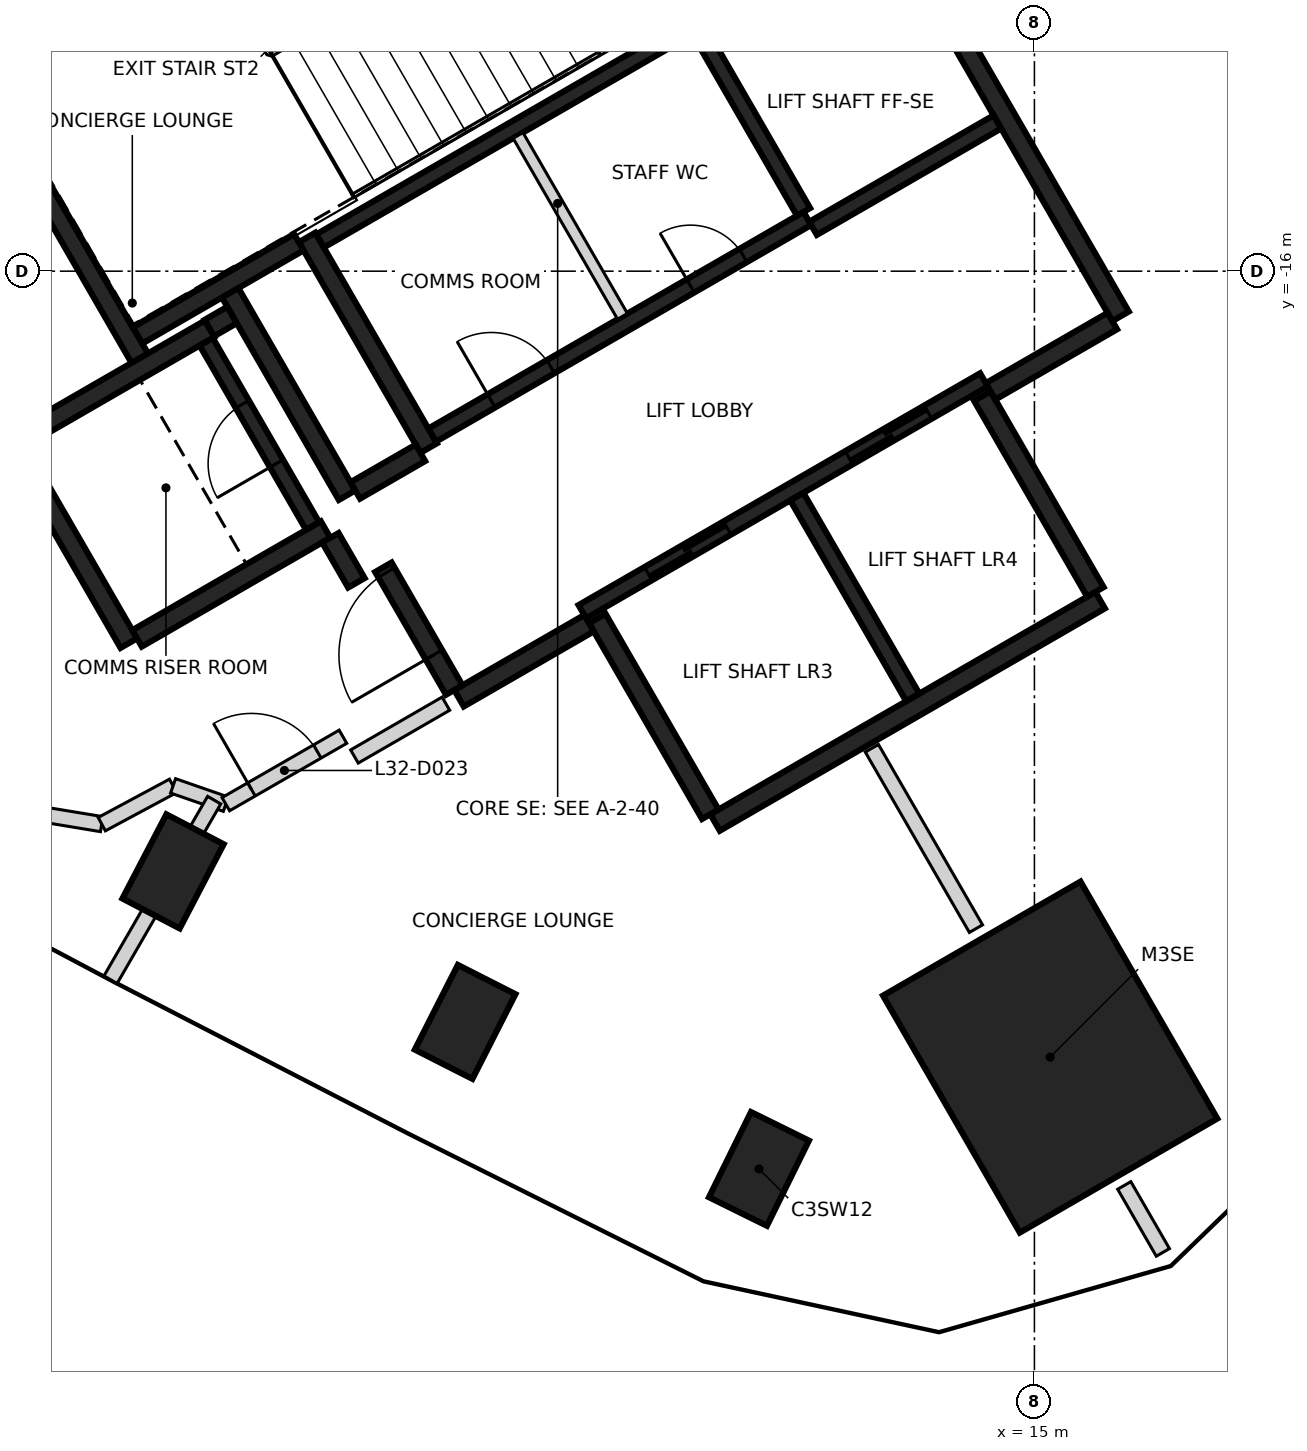
"""IFC4 building model, lengths in metres.
Left out: names, types, materials, properties, quantities, classifications, styles, units other than length and angle.
Written with IfcOpenShell. Run it as: python <this file> out.ifc"""

import sys

from ifc_helpers import new_model, si_unit, direction, frame, frame_2d, origin, origin_2d, place, context, subcontext, project, spatial, rectangle, extrude, element, fill, save


model = new_model("IFC4")
c1 = context("Model", 3, precision=1e-05, world=origin(), true_north=direction((0.0, 1.0)))
c2 = subcontext(c1, "Body", "Model", "MODEL_VIEW")
j1 = project(units=[si_unit("LENGTHUNIT", "METRE"), si_unit("PLANEANGLEUNIT", "RADIAN")], contexts=[c1])
p1 = place(None, origin())
s1 = spatial("IfcSite", under=j1, at=p1, CompositionType="ELEMENT")
p2 = place(p1, origin())
s2 = spatial("IfcBuilding", under=s1, at=p2, CompositionType="ELEMENT")
p3 = place(p2, frame((0.0, 0.0, 132.4)))
s3 = spatial("IfcBuildingStorey", under=s2, at=p3, CompositionType="ELEMENT", Elevation=132.4)
for number, where, z_axis, x_axis in (
    (1, (3.667, -23.896, -0.4), (0.0, 0.0, 1.0), (0.463, 0.886, 0.0)),
    (2, (7.51, -25.876, -0.4), (0.0, 0.0, 1.0), (0.453, 0.892, 0.0)),
    (3, (11.376, -27.811, -0.4), (0.0, 0.0, 1.0), (0.442, 0.897, 0.0)),
):
    element("IfcColumn", number, at=place(p3, frame(where, z_axis=z_axis, x_axis=x_axis)), inside=s3, PredefinedType="COLUMN", context=c2, shape_type="SweptSolid", body=[
        extrude(rectangle(XDim=1.25, YDim=0.85, at=origin_2d()), origin(), (0.0, 0.0, 1.0), 3.6),
    ])
p4 = place(p3, frame((15.207, -26.34, -0.4), z_axis=(0.0, 0.0, 1.0), x_axis=(-0.5, 0.866025403784, 0.0)))
e4 = element("IfcColumn", 4, at=p4, inside=s3, PredefinedType="COLUMN", context=c2, shape_type="SweptSolid", body=[
    extrude(rectangle(XDim=3.6, YDim=3.0, at=origin_2d()), origin(), (0.0, 0.0, 1.0), 3.6),
])
p5 = place(p3, frame((13.008, -11.181, 0.0), z_axis=(0.0, 0.0, 1.0), x_axis=(0.500004234368, -0.866022959057, 0.0)))
e5 = element("IfcWall", 5, at=p5, inside=s3, PredefinedType="SHEAR", context=c2, shape_type="SweptSolid", body=[
    extrude(rectangle(XDim=6.25, YDim=0.25, at=frame_2d((3.125, 0.0))), origin(), (0.0, 0.0, 1.0), 3.2),
])
p6 = place(p3, frame((15.865, -20.328, 0.0), z_axis=(0.0, 0.0, 1.0), x_axis=(-0.86602852612, -0.499994591916, 0.0)))
e6 = element("IfcWall", 6, at=p6, inside=s3, PredefinedType="SHEAR", context=c2, shape_type="SweptSolid", body=[
    extrude(rectangle(XDim=5.85, YDim=0.25, at=frame_2d((2.925, 0.0))), origin(), (0.0, 0.0, 1.0), 3.2),
])
p7 = place(p3, frame((3.235, -17.153, 0.0), z_axis=(0.0, 0.0, 1.0), x_axis=(-0.500008851346, 0.866020293397, 0.0)))
e7 = element("IfcWall", 7, at=p7, inside=s3, PredefinedType="SHEAR", context=c2, shape_type="SweptSolid", body=[
    extrude(rectangle(XDim=5.51, YDim=0.25, at=frame_2d((2.755, 0.0))), origin(), (0.0, 0.0, 1.0), 3.2),
])
p8 = place(p3, frame((7.031, -18.327, 0.0), z_axis=(0.0, 0.0, 1.0), x_axis=(-0.499971222258, 0.866042017984, 0.0)))
e8 = element("IfcWall", 8, at=p8, inside=s3, PredefinedType="SHEAR", context=c2, shape_type="SweptSolid", body=[
    extrude(rectangle(XDim=3.2, YDim=0.25, at=frame_2d((1.6, 0.0))), origin(), (0.0, 0.0, 1.0), 3.2),
])
for number, where, z_axis, x_axis in (
    (9, (14.315, -17.644, 0.0), (0.0, 0.0, 1.0), (0.5, -0.866, 0.0)),
    (10, (10.736, -23.145, 0.0), (0.0, 0.0, 1.0), (-0.5, 0.866, 0.0)),
):
    element("IfcWall", number, at=place(p3, frame(where, z_axis=z_axis, x_axis=x_axis)), inside=s3, PredefinedType="SHEAR", context=c2, shape_type="SweptSolid", body=[
        extrude(rectangle(XDim=2.974, YDim=0.25, at=frame_2d((1.487, 0.0))), origin(), (0.0, 0.0, 1.0), 3.2),
    ])
p9 = place(p3, frame((3.085, -20.894, 0.0), z_axis=(0.0, 0.0, 1.0), x_axis=(-0.499978833458, 0.866037623948, 0.0)))
e11 = element("IfcWall", 11, at=p9, inside=s3, PredefinedType="SHEAR", context=c2, shape_type="SweptSolid", body=[
    extrude(rectangle(XDim=3.05, YDim=0.25, at=frame_2d((1.525, 0.0))), origin(), (0.0, 0.0, 1.0), 3.2),
])
p10 = place(p3, frame((1.669, -18.19, 0.0), z_axis=(0.0, 0.0, 1.0), x_axis=(0.866042235819, 0.499970844928, 0.0)))
e12 = element("IfcWall", 12, at=p10, inside=s3, PredefinedType="SHEAR", context=c2, shape_type="SweptSolid", body=[
    extrude(rectangle(XDim=2.865, YDim=0.25, at=frame_2d((1.432, 0.0))), origin(), (0.0, 0.0, 1.0), 3.2),
])
p11 = place(p3, frame((5.675, -19.399, 0.0), z_axis=(0.0, 0.0, 1.0), x_axis=(-0.866026637627, -0.499997862916, 0.0)))
e13 = element("IfcWall", 13, at=p11, inside=s3, PredefinedType="SHEAR", context=c2, shape_type="SweptSolid", body=[
    extrude(rectangle(XDim=2.865, YDim=0.25, at=frame_2d((1.432, 0.0))), origin(), (0.0, 0.0, 1.0), 3.2),
])
p12 = place(p3, frame((4.414, -16.276, 0.0), z_axis=(0.0, 0.0, 1.0), x_axis=(0.500003324108, -0.866023484601, 0.0)))
e14 = element("IfcWall", 14, at=p12, inside=s3, PredefinedType="SHEAR", context=c2, shape_type="SweptSolid", body=[
    extrude(rectangle(XDim=3.085, YDim=0.25, at=frame_2d((1.542, 0.0))), origin(), (0.0, 0.0, 1.0), 3.2),
])
p13 = place(p3, frame((5.322, -15.619, 0.0), z_axis=(0.0, 0.0, 1.0), x_axis=(-0.866026229868, -0.499998569178, 0.0)))
e15 = element("IfcWall", 15, at=p13, inside=s3, PredefinedType="SHEAR", context=c2, shape_type="SweptSolid", body=[
    extrude(rectangle(XDim=2.449, YDim=0.25, at=frame_2d((1.225, 0.0))), origin(), (0.0, 0.0, 1.0), 3.2),
])
p14 = place(p3, frame((9.14, -20.631, 0.0), z_axis=(0.0, 0.0, 1.0), x_axis=(-0.866043531843, -0.499968599967, 0.0)))
e16 = element("IfcWall", 16, at=p14, inside=s3, PredefinedType="SHEAR", context=c2, shape_type="SweptSolid", body=[
    extrude(rectangle(XDim=1.975, YDim=0.25, at=frame_2d((0.987, 0.0))), origin(), (0.0, 0.0, 1.0), 3.2),
])
p15 = place(p3, frame((16.025, -16.656, 0.0), z_axis=(0.0, 0.0, 1.0), x_axis=(-0.866016279763, -0.500015802937, 0.0)))
e17 = element("IfcWall", 17, at=p15, inside=s3, PredefinedType="SHEAR", context=c2, shape_type="SweptSolid", body=[
    extrude(rectangle(XDim=1.849, YDim=0.25, at=frame_2d((0.925, 0.0))), origin(), (0.0, 0.0, 1.0), 3.2),
])
p16 = place(p3, frame((7.367, -21.51, 0.0), z_axis=(0.0, 0.0, 1.0), x_axis=(-0.499983108224, 0.866035156036, 0.0)))
e18 = element("IfcWall", 18, at=p16, inside=s3, PredefinedType="SHEAR", context=c2, shape_type="SweptSolid", body=[
    extrude(rectangle(XDim=1.865, YDim=0.25, at=frame_2d((0.932, 0.0))), origin(), (0.0, 0.0, 1.0), 3.2),
])
p17 = place(p16, frame((0.535, 0.0, 0.0)))
e19 = element("IfcOpeningElement", 19, at=p17, cuts=e18, PredefinedType="OPENING", context=c2, shape_type="SweptSolid", body=[
    extrude(rectangle(XDim=1.25, YDim=2.1, at=frame_2d((0.625, 1.05))), frame((0.0, 0.135, 0.0), z_axis=(0.0, -1.0, 0.0), x_axis=(1.0, 0.0, 0.0)), (0.0, 0.0, 1.0), 0.27),
])
p18 = place(p3, frame((6.065, -18.885, 0.0), z_axis=(0.0, 0.0, 1.0), x_axis=(0.866017078145, 0.500014420154, 0.0)))
e20 = element("IfcWall", 20, at=p18, inside=s3, PredefinedType="SHEAR", context=c2, shape_type="SweptSolid", body=[
    extrude(rectangle(XDim=0.989, YDim=0.25, at=frame_2d((0.495, 0.0))), origin(), (0.0, 0.0, 1.0), 3.2),
])
p19 = place(p3, frame((6.08, -20.1, 0.0), z_axis=(0.0, 0.0, 1.0), x_axis=(-0.500051773299, 0.865995510393, 0.0)))
e21 = element("IfcWall", 21, at=p19, inside=s3, PredefinedType="SHEAR", context=c2, shape_type="SweptSolid", body=[
    extrude(rectangle(XDim=0.685, YDim=0.25, at=frame_2d((0.342, 0.0))), origin(), (0.0, 0.0, 1.0), 3.2),
])
p20 = place(p3, frame((4.145, -16.749, 0.0), z_axis=(0.0, 0.0, 1.0), x_axis=(0.866185586049, 0.49972245349, 0.0)))
e22 = element("IfcWall", 22, at=p20, inside=s3, PredefinedType="SHEAR", context=c2, shape_type="SweptSolid", body=[
    extrude(rectangle(XDim=0.344, YDim=0.25, at=frame_2d((0.172, 0.0))), origin(), (0.0, 0.0, 1.0), 3.2),
])
p21 = place(p3, frame((9.052, -20.48, 0.0), z_axis=(0.0, 0.0, 1.0), x_axis=(0.866030299012, 0.499991521122, 0.0)))
e23 = element("IfcWall", 23, at=p21, inside=s3, PredefinedType="SHEAR", context=c2, shape_type="SweptSolid", body=[
    extrude(rectangle(XDim=6.1, YDim=0.2, at=frame_2d((3.05, 0.0))), origin(), (0.0, 0.0, 1.0), 3.2),
])
p22 = place(p21, frame((1.0, 0.0, 0.0)))
e24 = element("IfcOpeningElement", 24, at=p22, cuts=e23, PredefinedType="OPENING", context=c2, shape_type="SweptSolid", body=[
    extrude(rectangle(XDim=1.2, YDim=2.1, at=frame_2d((0.6, 1.05))), frame((0.0, 0.11, 0.0), z_axis=(0.0, -1.0, 0.0), x_axis=(1.0, 0.0, 0.0)), (0.0, 0.0, 1.0), 0.22),
])
p23 = place(p21, frame((4.05, 0.0, 0.0)))
e25 = element("IfcOpeningElement", 25, at=p23, cuts=e23, PredefinedType="OPENING", context=c2, shape_type="SweptSolid", body=[
    extrude(rectangle(XDim=1.2, YDim=2.1, at=frame_2d((0.6, 1.05))), frame((0.0, 0.11, 0.0), z_axis=(0.0, -1.0, 0.0), x_axis=(1.0, 0.0, 0.0)), (0.0, 0.0, 1.0), 0.22),
])
p24 = place(p3, frame((10.538, -12.752, 0.0), z_axis=(0.0, 0.0, 1.0), x_axis=(-0.866038630372, -0.499977090179, 0.0)))
e26 = element("IfcWall", 26, at=p24, inside=s3, PredefinedType="SHEAR", context=c2, shape_type="SweptSolid", body=[
    extrude(rectangle(XDim=5.699, YDim=0.2, at=frame_2d((2.85, 0.0))), origin(), (0.0, 0.0, 1.0), 3.2),
])
p25 = place(p3, frame((7.077, -18.156, 0.0), z_axis=(0.0, 0.0, 1.0), x_axis=(0.866038630372, 0.499977090179, 0.0)))
e27 = element("IfcWall", 27, at=p25, inside=s3, PredefinedType="SHEAR", context=c2, shape_type="SweptSolid", body=[
    extrude(rectangle(XDim=5.699, YDim=0.2, at=frame_2d((2.85, 0.0))), origin(), (0.0, 0.0, 1.0), 3.2),
])
p26 = place(p25, frame((0.899, 0.0, 0.0)))
e28 = element("IfcOpeningElement", 28, at=p26, cuts=e27, PredefinedType="OPENING", context=c2, shape_type="SweptSolid", body=[
    extrude(rectangle(XDim=0.9, YDim=2.1, at=frame_2d((0.45, 1.05))), frame((0.0, 0.11, 0.0), z_axis=(0.0, -1.0, 0.0), x_axis=(1.0, 0.0, 0.0)), (0.0, 0.0, 1.0), 0.22),
])
p27 = place(p25, frame((3.924, 0.0, 0.0)))
e29 = element("IfcOpeningElement", 29, at=p27, cuts=e27, PredefinedType="OPENING", context=c2, shape_type="SweptSolid", body=[
    extrude(rectangle(XDim=0.8, YDim=2.1, at=frame_2d((0.4, 1.05))), frame((0.0, 0.11, 0.0), z_axis=(0.0, -1.0, 0.0), x_axis=(1.0, 0.0, 0.0)), (0.0, 0.0, 1.0), 0.22),
])
p28 = place(p3, frame((11.875, -18.967, 0.0), z_axis=(0.0, 0.0, 1.0), x_axis=(0.49998131003, -0.866036194175, 0.0)))
e30 = element("IfcWall", 30, at=p28, inside=s3, PredefinedType="SHEAR", context=c2, shape_type="SweptSolid", body=[
    extrude(rectangle(XDim=3.048, YDim=0.2, at=frame_2d((1.524, 0.0))), origin(), (0.0, 0.0, 1.0), 3.2),
])
p29 = place(p3, frame((5.503, -19.352, 0.0), z_axis=(0.0, 0.0, 1.0), x_axis=(-0.499986818241, 0.866033014143, 0.0)))
e31 = element("IfcWall", 31, at=p29, inside=s3, PredefinedType="SHEAR", context=c2, shape_type="SweptSolid", body=[
    extrude(rectangle(XDim=2.798, YDim=0.2, at=frame_2d((1.399, 0.0))), origin(), (0.0, 0.0, 1.0), 3.2),
])
p30 = place(p29, frame((0.949, 0.0, 0.0)))
e32 = element("IfcOpeningElement", 32, at=p30, cuts=e31, PredefinedType="OPENING", context=c2, shape_type="SweptSolid", body=[
    extrude(rectangle(XDim=0.9, YDim=2.1, at=frame_2d((0.45, 1.05))), frame((0.0, 0.11, 0.0), z_axis=(0.0, -1.0, 0.0), x_axis=(1.0, 0.0, 0.0)), (0.0, 0.0, 1.0), 0.22),
])
p31 = place(p3, frame((11.963, -15.22, 0.0), z_axis=(0.0, 0.0, 1.0), x_axis=(-0.500034990121, 0.866005201286, 0.0)))
e33 = element("IfcWall", 33, at=p31, inside=s3, PredefinedType="SHEAR", context=c2, shape_type="SweptSolid", body=[
    extrude(rectangle(XDim=2.75, YDim=0.2, at=frame_2d((1.375, 0.0))), origin(), (0.0, 0.0, 1.0), 3.2),
])
p32 = place(p3, frame((14.512, -14.037, 0.0), z_axis=(0.0, 0.0, 1.0), x_axis=(-0.866044696403, -0.499966582715, 0.0)))
e34 = element("IfcWall", 34, at=p32, inside=s3, PredefinedType="SHEAR", context=c2, shape_type="SweptSolid", body=[
    extrude(rectangle(XDim=2.799, YDim=0.2, at=frame_2d((1.399, 0.0))), origin(), (0.0, 0.0, 1.0), 3.2),
])
p33 = place(p3, frame((8.207, -14.214, 0.0), z_axis=(0.0, 0.0, 1.0), x_axis=(0.50002746344, -0.86600954718, 0.0)))
e35 = element("IfcWall", 35, at=p33, inside=s3, PredefinedType="PARTITIONING", context=c2, shape_type="SweptSolid", body=[
    extrude(rectangle(XDim=2.748, YDim=0.15, at=frame_2d((1.374, 0.0))), origin(), (0.0, 0.0, 1.0), 3.2),
])
p34 = place(p3, frame((1.584, -23.086, 0.0), z_axis=(0.0, 0.0, 1.0), x_axis=(0.986654221629, -0.162829502674, 0.0)))
e36 = element("IfcWall", 36, at=p34, inside=s3, PredefinedType="PARTITIONING", context=c2, shape_type="SweptSolid", body=[
    extrude(rectangle(XDim=1.16, YDim=0.2, at=frame_2d((0.58, 0.0))), origin(), (0.0, 0.0, 1.0), 2.3),
])
p35 = place(p3, frame((2.73, -23.275, 0.0), z_axis=(0.0, 0.0, 1.0), x_axis=(0.880927165636, 0.473251866182, 0.0)))
e37 = element("IfcWall", 37, at=p35, inside=s3, PredefinedType="PARTITIONING", context=c2, shape_type="SweptSolid", body=[
    extrude(rectangle(XDim=1.065, YDim=0.2, at=frame_2d((0.532, 0.0))), origin(), (0.0, 0.0, 1.0), 3.2),
])
p36 = place(p3, frame((3.668, -22.771, 0.0), z_axis=(0.0, 0.0, 1.0), x_axis=(0.944447470761, -0.328662402738, 0.0)))
e38 = element("IfcWall", 38, at=p36, inside=s3, PredefinedType="PARTITIONING", context=c2, shape_type="SweptSolid", body=[
    extrude(rectangle(XDim=0.735, YDim=0.2, at=frame_2d((0.367, 0.0))), origin(), (0.0, 0.0, 1.0), 3.2),
])
p37 = place(p3, frame((4.362, -23.012, 0.0), z_axis=(0.0, 0.0, 1.0), x_axis=(0.866692617793, 0.49884256661, 0.0)))
e39 = element("IfcWall", 39, at=p37, inside=s3, PredefinedType="PARTITIONING", context=c2, shape_type="SweptSolid", body=[
    extrude(rectangle(XDim=1.778, YDim=0.2, at=frame_2d((0.889, 0.0))), origin(), (0.0, 0.0, 1.0), 3.2),
])
p38 = place(p37, frame((0.389, 0.0, 0.0)))
e40 = element("IfcOpeningElement", 40, at=p38, cuts=e39, PredefinedType="OPENING", context=c2, shape_type="SweptSolid", body=[
    extrude(rectangle(XDim=1.0, YDim=2.1, at=frame_2d((0.5, 1.05))), frame((0.0, 0.11, 0.0), z_axis=(0.0, -1.0, 0.0), x_axis=(1.0, 0.0, 0.0)), (0.0, 0.0, 1.0), 0.22),
])
p39 = place(p3, frame((6.054, -22.385, 0.0), z_axis=(0.0, 0.0, 1.0), x_axis=(0.86593101922, 0.500163443238, 0.0)))
e41 = element("IfcWall", 41, at=p39, inside=s3, PredefinedType="PARTITIONING", context=c2, shape_type="SweptSolid", body=[
    extrude(rectangle(XDim=1.39, YDim=0.2, at=frame_2d((0.695, 0.0))), origin(), (0.0, 0.0, 1.0), 3.2),
])
p40 = place(p3, frame((2.845, -25.321, 0.0), z_axis=(0.0, 0.0, 1.0), x_axis=(0.499942002849, 0.866058885866, 0.0)))
e42 = element("IfcWall", 42, at=p40, inside=s3, PredefinedType="PARTITIONING", context=c2, shape_type="SweptSolid", body=[
    extrude(rectangle(XDim=2.727, YDim=0.2, at=frame_2d((1.364, 0.0))), origin(), (0.0, 0.0, 1.0), 3.2),
])
p41 = place(p3, frame((12.861, -22.276, 0.0), z_axis=(0.0, 0.0, 1.0), x_axis=(0.49982784299, -0.866124775868, 0.0)))
e43 = element("IfcWall", 43, at=p41, inside=s3, PredefinedType="PARTITIONING", context=c2, shape_type="SweptSolid", body=[
    extrude(rectangle(XDim=2.741, YDim=0.2, at=frame_2d((1.37, 0.0))), origin(), (0.0, 0.0, 1.0), 3.2),
])
p42 = place(p3, frame((16.182, -28.028, 0.0), z_axis=(0.0, 0.0, 1.0), x_axis=(0.499625455419, -0.866241539236, 0.0)))
e44 = element("IfcWall", 44, at=p42, inside=s3, PredefinedType="PARTITIONING", context=c2, shape_type="SweptSolid", body=[
    extrude(rectangle(XDim=1.017, YDim=0.2, at=frame_2d((0.508, 0.0))), origin(), (0.0, 0.0, 1.0), 3.2),
])
p43 = place(p22, origin())
e45 = element("IfcDoor", 45, at=p43, inside=s3, OperationType="DOUBLE_DOOR_SLIDING", PredefinedType="DOOR", context=c2, shape_type="SweptSolid", body=[
    extrude(rectangle(XDim=1.2, YDim=2.1, at=frame_2d((0.6, 1.05))), frame((0.0, 0.025, 0.0), z_axis=(0.0, -1.0, 0.0), x_axis=(1.0, 0.0, 0.0)), (0.0, 0.0, 1.0), 0.05),
])
fill(e24, e45)
p44 = place(p23, origin())
e46 = element("IfcDoor", 46, at=p44, inside=s3, OperationType="DOUBLE_DOOR_SLIDING", PredefinedType="DOOR", context=c2, shape_type="SweptSolid", body=[
    extrude(rectangle(XDim=1.2, YDim=2.1, at=frame_2d((0.6, 1.05))), frame((0.0, 0.025, 0.0), z_axis=(0.0, -1.0, 0.0), x_axis=(1.0, 0.0, 0.0)), (0.0, 0.0, 1.0), 0.05),
])
fill(e25, e46)
p45 = place(p17, origin())
e47 = element("IfcDoor", 47, at=p45, inside=s3, OperationType="SINGLE_SWING_LEFT", PredefinedType="DOOR", context=c2, shape_type="SweptSolid", body=[
    extrude(rectangle(XDim=1.25, YDim=2.1, at=frame_2d((0.625, 1.05))), frame((0.0, 0.025, 0.0), z_axis=(0.0, -1.0, 0.0), x_axis=(1.0, 0.0, 0.0)), (0.0, 0.0, 1.0), 0.05),
])
fill(e19, e47)
p46 = place(p26, origin())
e48 = element("IfcDoor", 48, at=p46, inside=s3, OperationType="SINGLE_SWING_RIGHT", PredefinedType="DOOR", context=c2, shape_type="SweptSolid", body=[
    extrude(rectangle(XDim=0.9, YDim=2.1, at=frame_2d((0.45, 1.05))), frame((0.0, 0.025, 0.0), z_axis=(0.0, -1.0, 0.0), x_axis=(1.0, 0.0, 0.0)), (0.0, 0.0, 1.0), 0.05),
])
fill(e28, e48)
p47 = place(p27, origin())
e49 = element("IfcDoor", 49, at=p47, inside=s3, OperationType="SINGLE_SWING_LEFT", PredefinedType="DOOR", context=c2, shape_type="SweptSolid", body=[
    extrude(rectangle(XDim=0.8, YDim=2.1, at=frame_2d((0.4, 1.05))), frame((0.0, 0.025, 0.0), z_axis=(0.0, -1.0, 0.0), x_axis=(1.0, 0.0, 0.0)), (0.0, 0.0, 1.0), 0.05),
])
fill(e29, e49)
p48 = place(p30, origin())
e50 = element("IfcDoor", 50, at=p48, inside=s3, OperationType="SINGLE_SWING_RIGHT", PredefinedType="DOOR", context=c2, shape_type="SweptSolid", body=[
    extrude(rectangle(XDim=0.9, YDim=2.1, at=frame_2d((0.45, 1.05))), frame((0.0, 0.025, 0.0), z_axis=(0.0, -1.0, 0.0), x_axis=(1.0, 0.0, 0.0)), (0.0, 0.0, 1.0), 0.05),
])
fill(e32, e50)
p49 = place(p38, frame((1.0, 0.0, 0.0), z_axis=(0.0, 0.0, 1.0), x_axis=(-1.0, 0.0, 0.0)))
e51 = element("IfcDoor", 51, at=p49, inside=s3, OperationType="SINGLE_SWING_LEFT", PredefinedType="DOOR", context=c2, shape_type="SweptSolid", body=[
    extrude(rectangle(XDim=1.0, YDim=2.1, at=frame_2d((0.5, 1.05))), frame((0.0, 0.025, 0.0), z_axis=(0.0, -1.0, 0.0), x_axis=(1.0, 0.0, 0.0)), (0.0, 0.0, 1.0), 0.05),
])
fill(e40, e51)
save(model, sys.argv[1])
